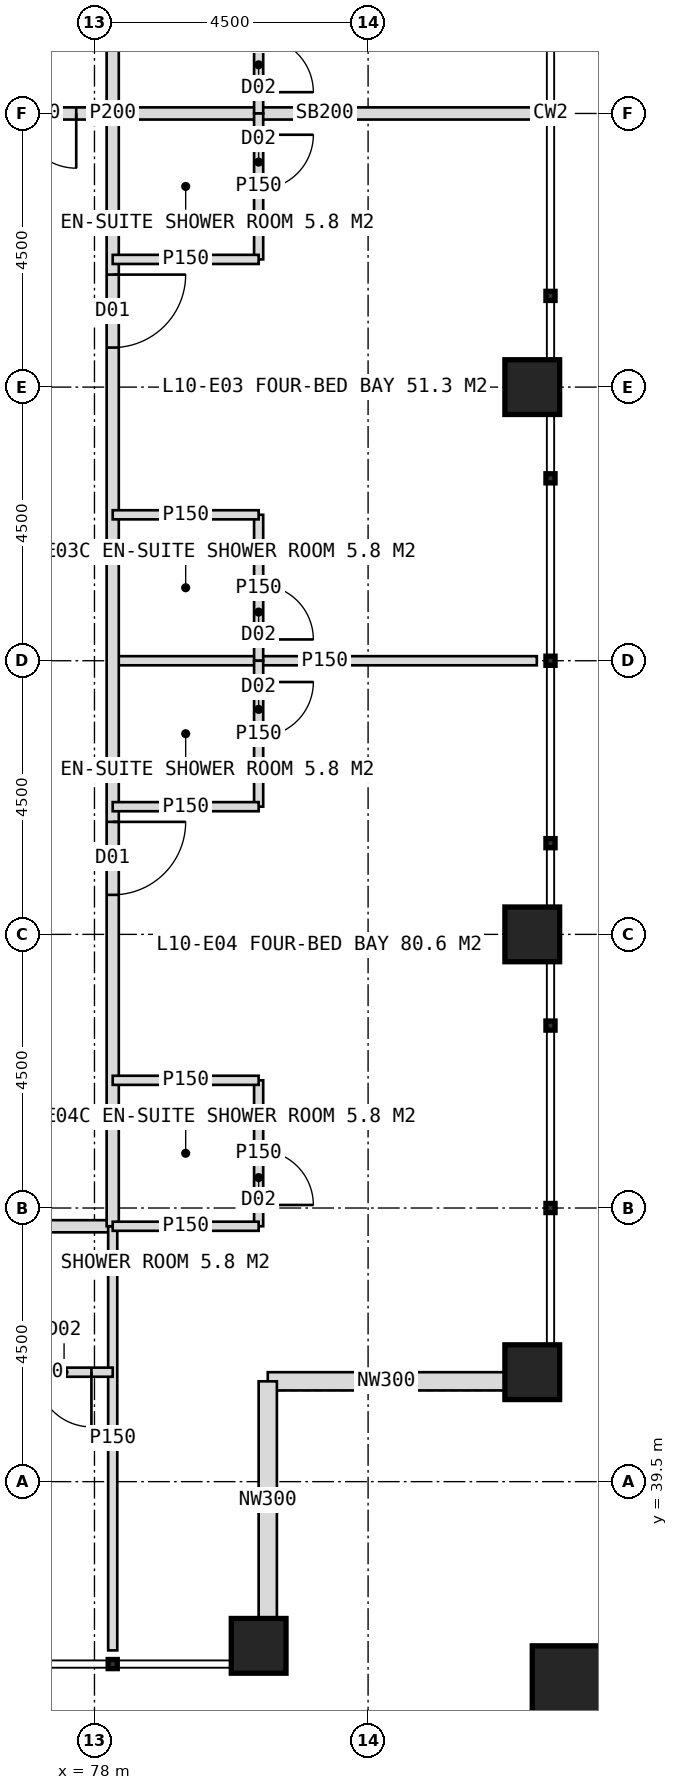
"""IFC4 building model, lengths in metres.
Left out: names, types, materials, properties, quantities, classifications, styles, units other than length and angle.
Written with IfcOpenShell. Run it as: python <this file> out.ifc"""

import sys

from ifc_helpers import new_model, si_unit, direction, frame, frame_2d, origin, origin_2d, place, context, subcontext, project, spatial, rectangle, hollow_rectangle, extrude, element, fill, save


model = new_model("IFC4")
c1 = context("Model", 3, precision=1e-05, world=origin(), true_north=direction((0.0, 1.0)))
c2 = subcontext(c1, "Body", "Model", "MODEL_VIEW")
j1 = project(units=[si_unit("LENGTHUNIT", "METRE"), si_unit("PLANEANGLEUNIT", "RADIAN")], contexts=[c1])
p1 = place(None, origin())
s1 = spatial("IfcSite", under=j1, at=p1, CompositionType="ELEMENT")
p2 = place(p1, origin())
s2 = spatial("IfcBuilding", under=s1, at=p2, CompositionType="ELEMENT")
p3 = place(p2, frame((0.0, 0.0, 47.0)))
s3 = spatial("IfcBuildingStorey", under=s2, at=p3, CompositionType="ELEMENT", Elevation=47.0)
for number, where, z_axis, x_axis in (
    (1, (85.2, 41.3, 0.0), (0.0, 0.0, 1.0), (1.0, 0.0, 0.0)),
    (2, (85.2, 48.5, 0.0), (0.0, 0.0, 1.0), (1.0, 0.0, 0.0)),
    (3, (85.2, 57.5, 0.0), (0.0, 0.0, 1.0), (1.0, 0.0, 0.0)),
    (4, (80.7, 36.8, 0.0), (0.0, 0.0, 1.0), (1.0, 0.0, 0.0)),
):
    element("IfcColumn", number, at=place(p3, frame(where, z_axis=z_axis, x_axis=x_axis)), inside=s3, PredefinedType="COLUMN", context=c2, shape_type="SweptSolid", body=[
        extrude(hollow_rectangle(XDim=0.9, YDim=0.9, WallThickness=0.08, at=origin_2d()), origin(), (0.0, 0.0, 1.0), 4.0),
    ])
p4 = place(p3, frame((86.1, 35.9, 0.0), z_axis=(0.0, 0.0, 1.0), x_axis=(1.0, 0.0, 0.0)))
e5 = element("IfcColumn", 5, at=p4, inside=s3, PredefinedType="COLUMN", context=c2, shape_type="SweptSolid", body=[
    extrude(hollow_rectangle(XDim=1.8, YDim=1.8, WallThickness=0.1, at=origin_2d()), origin(), (0.0, 0.0, 1.0), 4.0),
])
for number, where, z_axis, x_axis in (
    (6, (84.75, 41.15, 0.0), (0.0, 0.0, 1.0), (-1.0, 0.0, 0.0)),
    (7, (80.85, 41.15, 0.0), (0.0, 0.0, 1.0), (0.0, -1.0, 0.0)),
):
    element("IfcWall", number, at=place(p3, frame(where, z_axis=z_axis, x_axis=x_axis)), inside=s3, PredefinedType="ELEMENTEDWALL", context=c2, shape_type="SweptSolid", body=[
        extrude(rectangle(XDim=3.9, YDim=0.3, at=frame_2d((1.95, 0.0))), origin(), (0.0, 0.0, 1.0), 2.95),
    ])
p5 = place(p3, frame((78.3, 43.7, 0.0), z_axis=(0.0, 0.0, 1.0), x_axis=(-1.0, 0.0, 0.0)))
e8 = element("IfcWall", 8, at=p5, inside=s3, PredefinedType="PARTITIONING", context=c2, shape_type="SweptSolid", body=[
    extrude(rectangle(XDim=36.6, YDim=0.2, at=frame_2d((18.3, 0.0))), origin(), (0.0, 0.0, 1.0), 3.75),
])
p6 = place(p5, frame((2.65, 0.0, 0.0)))
e9 = element("IfcOpeningElement", 9, at=p6, cuts=e8, PredefinedType="OPENING", context=c2, shape_type="SweptSolid", body=[
    extrude(rectangle(XDim=1.2, YDim=2.2, at=frame_2d((0.6, 1.1))), frame((0.0, 0.11, 0.0), z_axis=(0.0, -1.0, 0.0), x_axis=(1.0, 0.0, 0.0)), (0.0, 0.0, 1.0), 0.22),
])
p7 = place(p5, frame((11.95, 0.0, 0.0)))
e10 = element("IfcOpeningElement", 10, at=p7, cuts=e8, PredefinedType="OPENING", context=c2, shape_type="SweptSolid", body=[
    extrude(rectangle(XDim=1.2, YDim=2.2, at=frame_2d((0.6, 1.1))), frame((0.0, 0.11, 0.0), z_axis=(0.0, -1.0, 0.0), x_axis=(1.0, 0.0, 0.0)), (0.0, 0.0, 1.0), 0.22),
])
p8 = place(p5, frame((20.95, 0.0, 0.0)))
e11 = element("IfcOpeningElement", 11, at=p8, cuts=e8, PredefinedType="OPENING", context=c2, shape_type="SweptSolid", body=[
    extrude(rectangle(XDim=1.2, YDim=2.2, at=frame_2d((0.6, 1.1))), frame((0.0, 0.11, 0.0), z_axis=(0.0, -1.0, 0.0), x_axis=(1.0, 0.0, 0.0)), (0.0, 0.0, 1.0), 0.22),
])
p9 = place(p5, frame((29.95, 0.0, 0.0)))
e12 = element("IfcOpeningElement", 12, at=p9, cuts=e8, PredefinedType="OPENING", context=c2, shape_type="SweptSolid", body=[
    extrude(rectangle(XDim=1.2, YDim=2.2, at=frame_2d((0.6, 1.1))), frame((0.0, 0.11, 0.0), z_axis=(0.0, -1.0, 0.0), x_axis=(1.0, 0.0, 0.0)), (0.0, 0.0, 1.0), 0.22),
])
p10 = place(p3, frame((78.3, 43.7, 0.0), z_axis=(0.0, 0.0, 1.0), x_axis=(0.0, -1.0, 0.0)))
e13 = element("IfcWall", 13, at=p10, inside=s3, PredefinedType="PARTITIONING", context=c2, shape_type="SweptSolid", body=[
    extrude(rectangle(XDim=6.975, YDim=0.15, at=frame_2d((3.487, 0.0))), origin(), (0.0, 0.0, 1.0), 3.75),
])
p11 = place(p3, frame((78.3, 41.3, 0.0), z_axis=(0.0, 0.0, 1.0), x_axis=(-1.0, 0.0, 0.0)))
e14 = element("IfcWall", 14, at=p11, inside=s3, PredefinedType="PARTITIONING", context=c2, shape_type="SweptSolid", body=[
    extrude(rectangle(XDim=2.4, YDim=0.15, at=frame_2d((1.2, 0.0))), origin(), (0.0, 0.0, 1.0), 2.95),
])
p12 = place(p11, frame((0.35, 0.0, 0.0)))
e15 = element("IfcOpeningElement", 15, at=p12, cuts=e14, PredefinedType="OPENING", context=c2, shape_type="SweptSolid", body=[
    extrude(rectangle(XDim=0.9, YDim=2.1, at=frame_2d((0.45, 1.05))), frame((0.0, 0.085, 0.0), z_axis=(0.0, -1.0, 0.0), x_axis=(1.0, 0.0, 0.0)), (0.0, 0.0, 1.0), 0.17),
])
p13 = place(p3, frame((78.3, 62.0, 0.0), z_axis=(0.0, 0.0, 1.0), x_axis=(1.0, 0.0, 0.0)))
e16 = element("IfcWall", 16, at=p13, inside=s3, PredefinedType="SOLIDWALL", context=c2, shape_type="SweptSolid", body=[
    extrude(rectangle(XDim=6.975, YDim=0.2, at=frame_2d((3.487, 0.0))), origin(), (0.0, 0.0, 1.0), 2.75),
])
p14 = place(p3, frame((78.3, 53.0, 0.0), z_axis=(0.0, 0.0, 1.0), x_axis=(1.0, 0.0, 0.0)))
e17 = element("IfcWall", 17, at=p14, inside=s3, PredefinedType="PARTITIONING", context=c2, shape_type="SweptSolid", body=[
    extrude(rectangle(XDim=6.975, YDim=0.15, at=frame_2d((3.487, 0.0))), origin(), (0.0, 0.0, 1.0), 3.75),
])
p15 = place(p3, frame((78.3, 80.3, 0.0), z_axis=(0.0, 0.0, 1.0), x_axis=(0.0, -1.0, 0.0)))
e18 = element("IfcWall", 18, at=p15, inside=s3, PredefinedType="PARTITIONING", context=c2, shape_type="SweptSolid", body=[
    extrude(rectangle(XDim=36.6, YDim=0.2, at=frame_2d((18.3, 0.0))), origin(), (0.0, 0.0, 1.0), 3.75),
])
p16 = place(p15, frame((2.65, 0.0, 0.0)))
e19 = element("IfcOpeningElement", 19, at=p16, cuts=e18, PredefinedType="OPENING", context=c2, shape_type="SweptSolid", body=[
    extrude(rectangle(XDim=1.2, YDim=2.2, at=frame_2d((0.6, 1.1))), frame((0.0, 0.11, 0.0), z_axis=(0.0, -1.0, 0.0), x_axis=(1.0, 0.0, 0.0)), (0.0, 0.0, 1.0), 0.22),
])
p17 = place(p15, frame((11.95, 0.0, 0.0)))
e20 = element("IfcOpeningElement", 20, at=p17, cuts=e18, PredefinedType="OPENING", context=c2, shape_type="SweptSolid", body=[
    extrude(rectangle(XDim=1.2, YDim=2.2, at=frame_2d((0.6, 1.1))), frame((0.0, 0.11, 0.0), z_axis=(0.0, -1.0, 0.0), x_axis=(1.0, 0.0, 0.0)), (0.0, 0.0, 1.0), 0.22),
])
p18 = place(p15, frame((20.95, 0.0, 0.0)))
e21 = element("IfcOpeningElement", 21, at=p18, cuts=e18, PredefinedType="OPENING", context=c2, shape_type="SweptSolid", body=[
    extrude(rectangle(XDim=1.2, YDim=2.2, at=frame_2d((0.6, 1.1))), frame((0.0, 0.11, 0.0), z_axis=(0.0, -1.0, 0.0), x_axis=(1.0, 0.0, 0.0)), (0.0, 0.0, 1.0), 0.22),
])
p19 = place(p15, frame((29.95, 0.0, 0.0)))
e22 = element("IfcOpeningElement", 22, at=p19, cuts=e18, PredefinedType="OPENING", context=c2, shape_type="SweptSolid", body=[
    extrude(rectangle(XDim=1.2, YDim=2.2, at=frame_2d((0.6, 1.1))), frame((0.0, 0.11, 0.0), z_axis=(0.0, -1.0, 0.0), x_axis=(1.0, 0.0, 0.0)), (0.0, 0.0, 1.0), 0.22),
])
p20 = place(p3, frame((80.7, 64.4, 0.0), z_axis=(0.0, 0.0, 1.0), x_axis=(0.0, -1.0, 0.0)))
e23 = element("IfcWall", 23, at=p20, inside=s3, PredefinedType="PARTITIONING", context=c2, shape_type="SweptSolid", body=[
    extrude(rectangle(XDim=2.4, YDim=0.15, at=frame_2d((1.2, 0.0))), origin(), (0.0, 0.0, 1.0), 3.75),
])
p21 = place(p20, frame((1.15, 0.0, 0.0)))
e24 = element("IfcOpeningElement", 24, at=p21, cuts=e23, PredefinedType="OPENING", context=c2, shape_type="SweptSolid", body=[
    extrude(rectangle(XDim=0.9, YDim=2.1, at=frame_2d((0.45, 1.05))), frame((0.0, 0.085, 0.0), z_axis=(0.0, -1.0, 0.0), x_axis=(1.0, 0.0, 0.0)), (0.0, 0.0, 1.0), 0.17),
])
p22 = place(p3, frame((80.7, 62.0, 0.0), z_axis=(0.0, 0.0, 1.0), x_axis=(0.0, -1.0, 0.0)))
e25 = element("IfcWall", 25, at=p22, inside=s3, PredefinedType="PARTITIONING", context=c2, shape_type="SweptSolid", body=[
    extrude(rectangle(XDim=2.4, YDim=0.15, at=frame_2d((1.2, 0.0))), origin(), (0.0, 0.0, 1.0), 3.75),
])
p23 = place(p22, frame((0.35, 0.0, 0.0)))
e26 = element("IfcOpeningElement", 26, at=p23, cuts=e25, PredefinedType="OPENING", context=c2, shape_type="SweptSolid", body=[
    extrude(rectangle(XDim=0.9, YDim=2.1, at=frame_2d((0.45, 1.05))), frame((0.0, 0.085, 0.0), z_axis=(0.0, -1.0, 0.0), x_axis=(1.0, 0.0, 0.0)), (0.0, 0.0, 1.0), 0.17),
])
p24 = place(p3, frame((78.3, 59.6, 0.0), z_axis=(0.0, 0.0, 1.0), x_axis=(1.0, 0.0, 0.0)))
e27 = element("IfcWall", 27, at=p24, inside=s3, PredefinedType="PARTITIONING", context=c2, shape_type="SweptSolid", body=[
    extrude(rectangle(XDim=2.4, YDim=0.15, at=frame_2d((1.2, 0.0))), origin(), (0.0, 0.0, 1.0), 3.75),
])
p25 = place(p3, frame((80.7, 55.4, 0.0), z_axis=(0.0, 0.0, 1.0), x_axis=(0.0, -1.0, 0.0)))
e28 = element("IfcWall", 28, at=p25, inside=s3, PredefinedType="PARTITIONING", context=c2, shape_type="SweptSolid", body=[
    extrude(rectangle(XDim=2.4, YDim=0.15, at=frame_2d((1.2, 0.0))), origin(), (0.0, 0.0, 1.0), 3.75),
])
p26 = place(p25, frame((1.15, 0.0, 0.0)))
e29 = element("IfcOpeningElement", 29, at=p26, cuts=e28, PredefinedType="OPENING", context=c2, shape_type="SweptSolid", body=[
    extrude(rectangle(XDim=0.9, YDim=2.1, at=frame_2d((0.45, 1.05))), frame((0.0, 0.085, 0.0), z_axis=(0.0, -1.0, 0.0), x_axis=(1.0, 0.0, 0.0)), (0.0, 0.0, 1.0), 0.17),
])
p27 = place(p3, frame((78.3, 55.4, 0.0), z_axis=(0.0, 0.0, 1.0), x_axis=(1.0, 0.0, 0.0)))
e30 = element("IfcWall", 30, at=p27, inside=s3, PredefinedType="PARTITIONING", context=c2, shape_type="SweptSolid", body=[
    extrude(rectangle(XDim=2.4, YDim=0.15, at=frame_2d((1.2, 0.0))), origin(), (0.0, 0.0, 1.0), 3.75),
])
p28 = place(p3, frame((80.7, 53.0, 0.0), z_axis=(0.0, 0.0, 1.0), x_axis=(0.0, -1.0, 0.0)))
e31 = element("IfcWall", 31, at=p28, inside=s3, PredefinedType="PARTITIONING", context=c2, shape_type="SweptSolid", body=[
    extrude(rectangle(XDim=2.4, YDim=0.15, at=frame_2d((1.2, 0.0))), origin(), (0.0, 0.0, 1.0), 3.75),
])
p29 = place(p28, frame((0.35, 0.0, 0.0)))
e32 = element("IfcOpeningElement", 32, at=p29, cuts=e31, PredefinedType="OPENING", context=c2, shape_type="SweptSolid", body=[
    extrude(rectangle(XDim=0.9, YDim=2.1, at=frame_2d((0.45, 1.05))), frame((0.0, 0.085, 0.0), z_axis=(0.0, -1.0, 0.0), x_axis=(1.0, 0.0, 0.0)), (0.0, 0.0, 1.0), 0.17),
])
p30 = place(p3, frame((78.3, 50.6, 0.0), z_axis=(0.0, 0.0, 1.0), x_axis=(1.0, 0.0, 0.0)))
e33 = element("IfcWall", 33, at=p30, inside=s3, PredefinedType="PARTITIONING", context=c2, shape_type="SweptSolid", body=[
    extrude(rectangle(XDim=2.4, YDim=0.15, at=frame_2d((1.2, 0.0))), origin(), (0.0, 0.0, 1.0), 3.75),
])
p31 = place(p3, frame((80.7, 46.1, 0.0), z_axis=(0.0, 0.0, 1.0), x_axis=(0.0, -1.0, 0.0)))
e34 = element("IfcWall", 34, at=p31, inside=s3, PredefinedType="PARTITIONING", context=c2, shape_type="SweptSolid", body=[
    extrude(rectangle(XDim=2.4, YDim=0.15, at=frame_2d((1.2, 0.0))), origin(), (0.0, 0.0, 1.0), 2.95),
])
p32 = place(p31, frame((1.15, 0.0, 0.0)))
e35 = element("IfcOpeningElement", 35, at=p32, cuts=e34, PredefinedType="OPENING", context=c2, shape_type="SweptSolid", body=[
    extrude(rectangle(XDim=0.9, YDim=2.1, at=frame_2d((0.45, 1.05))), frame((0.0, 0.085, 0.0), z_axis=(0.0, -1.0, 0.0), x_axis=(1.0, 0.0, 0.0)), (0.0, 0.0, 1.0), 0.17),
])
for number, where, z_axis, x_axis in (
    (36, (78.3, 46.1, 0.0), (0.0, 0.0, 1.0), (1.0, 0.0, 0.0)),
    (37, (78.3, 43.7, 0.0), (0.0, 0.0, 1.0), (1.0, 0.0, 0.0)),
):
    element("IfcWall", number, at=place(p3, frame(where, z_axis=z_axis, x_axis=x_axis)), inside=s3, PredefinedType="PARTITIONING", context=c2, shape_type="SweptSolid", body=[
        extrude(rectangle(XDim=2.4, YDim=0.15, at=frame_2d((1.2, 0.0))), origin(), (0.0, 0.0, 1.0), 3.75),
    ])
p33 = place(p3, frame((75.6, 62.0, 0.0), z_axis=(0.0, 0.0, 1.0), x_axis=(1.0, 0.0, 0.0)))
e38 = element("IfcWall", 38, at=p33, inside=s3, PredefinedType="SOLIDWALL", context=c2, shape_type="SweptSolid", body=[
    extrude(rectangle(XDim=2.7, YDim=0.2, at=frame_2d((1.35, 0.0))), origin(), (0.0, 0.0, 1.0), 2.75),
])
p34 = place(p33, frame((0.3, 0.0, 0.0)))
e39 = element("IfcOpeningElement", 39, at=p34, cuts=e38, PredefinedType="OPENING", context=c2, shape_type="SweptSolid", body=[
    extrude(rectangle(XDim=1.8, YDim=2.2, at=frame_2d((0.9, 1.1))), frame((0.0, 0.11, 0.0), z_axis=(0.0, -1.0, 0.0), x_axis=(1.0, 0.0, 0.0)), (0.0, 0.0, 1.0), 0.22),
])
p35 = place(p12, origin())
e40 = element("IfcDoor", 40, at=p35, inside=s3, OperationType="SINGLE_SWING_LEFT", PredefinedType="DOOR", context=c2, shape_type="SweptSolid", body=[
    extrude(rectangle(XDim=0.9, YDim=2.1, at=frame_2d((0.45, 1.05))), frame((0.0, 0.025, 0.0), z_axis=(0.0, -1.0, 0.0), x_axis=(1.0, 0.0, 0.0)), (0.0, 0.0, 1.0), 0.05),
])
fill(e15, e40)
p36 = place(p21, origin())
e41 = element("IfcDoor", 41, at=p36, inside=s3, OperationType="SINGLE_SWING_RIGHT", PredefinedType="DOOR", context=c2, shape_type="SweptSolid", body=[
    extrude(rectangle(XDim=0.9, YDim=2.1, at=frame_2d((0.45, 1.05))), frame((0.0, 0.025, 0.0), z_axis=(0.0, -1.0, 0.0), x_axis=(1.0, 0.0, 0.0)), (0.0, 0.0, 1.0), 0.05),
])
fill(e24, e41)
p37 = place(p18, origin())
e42 = element("IfcDoor", 42, at=p37, inside=s3, OperationType="SINGLE_SWING_LEFT", PredefinedType="DOOR", context=c2, shape_type="SweptSolid", body=[
    extrude(rectangle(XDim=1.2, YDim=2.2, at=frame_2d((0.6, 1.1))), frame((0.0, 0.025, 0.0), z_axis=(0.0, -1.0, 0.0), x_axis=(1.0, 0.0, 0.0)), (0.0, 0.0, 1.0), 0.05),
])
fill(e21, e42)
p38 = place(p23, origin())
e43 = element("IfcDoor", 43, at=p38, inside=s3, OperationType="SINGLE_SWING_LEFT", PredefinedType="DOOR", context=c2, shape_type="SweptSolid", body=[
    extrude(rectangle(XDim=0.9, YDim=2.1, at=frame_2d((0.45, 1.05))), frame((0.0, 0.025, 0.0), z_axis=(0.0, -1.0, 0.0), x_axis=(1.0, 0.0, 0.0)), (0.0, 0.0, 1.0), 0.05),
])
fill(e26, e43)
p39 = place(p26, origin())
e44 = element("IfcDoor", 44, at=p39, inside=s3, OperationType="SINGLE_SWING_RIGHT", PredefinedType="DOOR", context=c2, shape_type="SweptSolid", body=[
    extrude(rectangle(XDim=0.9, YDim=2.1, at=frame_2d((0.45, 1.05))), frame((0.0, 0.025, 0.0), z_axis=(0.0, -1.0, 0.0), x_axis=(1.0, 0.0, 0.0)), (0.0, 0.0, 1.0), 0.05),
])
fill(e29, e44)
p40 = place(p19, origin())
e45 = element("IfcDoor", 45, at=p40, inside=s3, OperationType="SINGLE_SWING_LEFT", PredefinedType="DOOR", context=c2, shape_type="SweptSolid", body=[
    extrude(rectangle(XDim=1.2, YDim=2.2, at=frame_2d((0.6, 1.1))), frame((0.0, 0.025, 0.0), z_axis=(0.0, -1.0, 0.0), x_axis=(1.0, 0.0, 0.0)), (0.0, 0.0, 1.0), 0.05),
])
fill(e22, e45)
p41 = place(p29, origin())
e46 = element("IfcDoor", 46, at=p41, inside=s3, OperationType="SINGLE_SWING_LEFT", PredefinedType="DOOR", context=c2, shape_type="SweptSolid", body=[
    extrude(rectangle(XDim=0.9, YDim=2.1, at=frame_2d((0.45, 1.05))), frame((0.0, 0.025, 0.0), z_axis=(0.0, -1.0, 0.0), x_axis=(1.0, 0.0, 0.0)), (0.0, 0.0, 1.0), 0.05),
])
fill(e32, e46)
p42 = place(p32, origin())
e47 = element("IfcDoor", 47, at=p42, inside=s3, OperationType="SINGLE_SWING_RIGHT", PredefinedType="DOOR", context=c2, shape_type="SweptSolid", body=[
    extrude(rectangle(XDim=0.9, YDim=2.1, at=frame_2d((0.45, 1.05))), frame((0.0, 0.025, 0.0), z_axis=(0.0, -1.0, 0.0), x_axis=(1.0, 0.0, 0.0)), (0.0, 0.0, 1.0), 0.05),
])
fill(e35, e47)
p43 = place(p34, origin())
e48 = element("IfcDoor", 48, at=p43, inside=s3, OperationType="DOUBLE_DOOR_DOUBLE_SWING", PredefinedType="DOOR", context=c2, shape_type="SweptSolid", body=[
    extrude(rectangle(XDim=1.8, YDim=2.2, at=frame_2d((0.9, 1.1))), frame((0.0, 0.025, 0.0), z_axis=(0.0, -1.0, 0.0), x_axis=(1.0, 0.0, 0.0)), (0.0, 0.0, 1.0), 0.05),
])
fill(e39, e48)
save(model, sys.argv[1])
